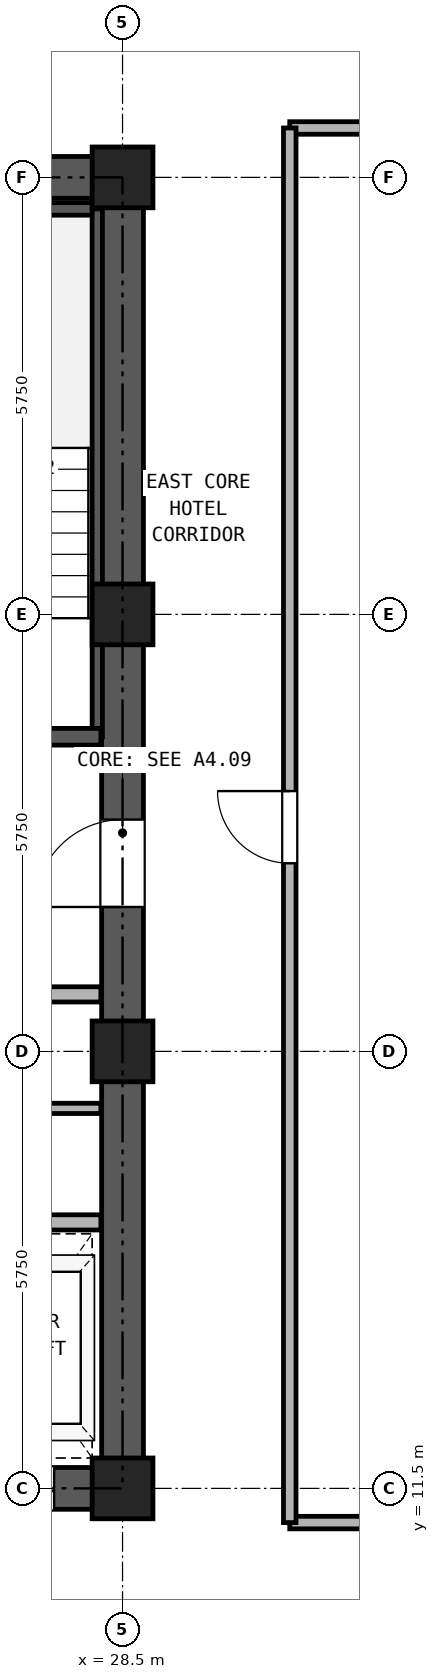
"""IFC4 building model, lengths in metres.
Left out: names, types, materials, properties, quantities, classifications, styles, units other than length and angle.
Written with IfcOpenShell. Run it as: python <this file> out.ifc"""

import sys

from ifc_helpers import new_model, si_unit, direction, frame, frame_2d, origin, origin_2d, place, context, subcontext, project, spatial, rectangle, hollow_rectangle, extrude, source, transform, mapped, element, fill, save


model = new_model("IFC4")
c1 = context("Model", 3, precision=1e-05, world=origin(), true_north=direction((0.0, 1.0)))
c2 = subcontext(c1, "Body", "Model", "MODEL_VIEW")
j1 = project(units=[si_unit("LENGTHUNIT", "METRE"), si_unit("PLANEANGLEUNIT", "RADIAN")], contexts=[c1])
p1 = place(None, origin())
s1 = spatial("IfcSite", under=j1, at=p1, CompositionType="ELEMENT")
p2 = place(p1, origin())
s2 = spatial("IfcBuilding", under=s1, at=p2, CompositionType="ELEMENT")
p3 = place(p2, frame((0.0, 0.0, 124.7)))
s3 = spatial("IfcBuildingStorey", under=s2, at=p3, CompositionType="ELEMENT", Elevation=124.7)
m1 = source(origin(), c2, "Body", "SweptSolid", [
    extrude(hollow_rectangle(XDim=0.8, YDim=0.8, WallThickness=0.045, at=origin_2d()), origin(), (0.0, 0.0, 1.0), 2.95),
])
for number, where, z_axis, x_axis in (
    (1, (28.5, 11.5, 0.0), (0.0, 0.0, 1.0), (1.0, 0.0, 0.0)),
    (2, (28.5, 17.25, 0.0), (0.0, 0.0, 1.0), (1.0, 0.0, 0.0)),
    (3, (28.5, 23.0, 0.0), (0.0, 0.0, 1.0), (1.0, 0.0, 0.0)),
    (4, (28.5, 28.75, 0.0), (0.0, 0.0, 1.0), (1.0, 0.0, 0.0)),
):
    element("IfcColumn", number, at=place(p3, frame(where, z_axis=z_axis, x_axis=x_axis)), inside=s3, PredefinedType="COLUMN", context=c2, shape_type="MappedRepresentation", body=[
        mapped(m1, transform((0.0, 0.0, 0.0), x_axis=(1.0, 0.0, 0.0), y_axis=(0.0, 1.0, 0.0), z_axis=(0.0, 0.0, 1.0), scale=1.0)),
    ])
p4 = place(p3, frame((18.225, 11.5, 0.0), z_axis=(0.0, 0.0, 1.0), x_axis=(1.0, 0.0, 0.0)))
e5 = element("IfcWall", 5, at=p4, inside=s3, PredefinedType="SHEAR", context=c2, shape_type="SweptSolid", body=[
    extrude(rectangle(XDim=10.55, YDim=0.55, at=frame_2d((5.275, 0.0))), origin(), (0.0, 0.0, 1.0), 2.95),
])
p5 = place(p4, frame((2.375, 0.0, 0.0)))
e6 = element("IfcOpeningElement", 6, at=p5, cuts=e5, PredefinedType="OPENING", context=c2, shape_type="SweptSolid", body=[
    extrude(rectangle(XDim=0.95, YDim=2.15, at=frame_2d((0.475, 1.075))), frame((0.0, 0.285, 0.0), z_axis=(0.0, -1.0, 0.0), x_axis=(1.0, 0.0, 0.0)), (0.0, 0.0, 1.0), 0.57),
])
p6 = place(p4, frame((5.875, 0.0, 0.0)))
e7 = element("IfcOpeningElement", 7, at=p6, cuts=e5, PredefinedType="OPENING", context=c2, shape_type="SweptSolid", body=[
    extrude(rectangle(XDim=1.1, YDim=2.25, at=frame_2d((0.55, 1.125))), frame((0.0, 0.285, 0.0), z_axis=(0.0, -1.0, 0.0), x_axis=(1.0, 0.0, 0.0)), (0.0, 0.0, 1.0), 0.57),
])
p7 = place(p4, frame((8.275, 0.0, 0.0)))
e8 = element("IfcOpeningElement", 8, at=p7, cuts=e5, PredefinedType="OPENING", context=c2, shape_type="SweptSolid", body=[
    extrude(rectangle(XDim=1.1, YDim=2.25, at=frame_2d((0.55, 1.125))), frame((0.0, 0.285, 0.0), z_axis=(0.0, -1.0, 0.0), x_axis=(1.0, 0.0, 0.0)), (0.0, 0.0, 1.0), 0.57),
])
p8 = place(p3, frame((18.225, 28.75, 0.0), z_axis=(0.0, 0.0, 1.0), x_axis=(1.0, 0.0, 0.0)))
e9 = element("IfcWall", 9, at=p8, inside=s3, PredefinedType="SHEAR", context=c2, shape_type="SweptSolid", body=[
    extrude(rectangle(XDim=10.55, YDim=0.55, at=frame_2d((5.275, 0.0))), origin(), (0.0, 0.0, 1.0), 2.95),
])
p9 = place(p8, frame((4.155, 0.0, 0.0)))
e10 = element("IfcOpeningElement", 10, at=p9, cuts=e9, PredefinedType="OPENING", context=c2, shape_type="SweptSolid", body=[
    extrude(rectangle(XDim=0.9, YDim=2.05, at=frame_2d((0.45, 1.025))), frame((0.0, 0.285, 0.0), z_axis=(0.0, -1.0, 0.0), x_axis=(1.0, 0.0, 0.0)), (0.0, 0.0, 1.0), 0.57),
])
p10 = place(p8, frame((5.695, 0.0, 0.0)))
e11 = element("IfcOpeningElement", 11, at=p10, cuts=e9, PredefinedType="OPENING", context=c2, shape_type="SweptSolid", body=[
    extrude(rectangle(XDim=0.9, YDim=2.05, at=frame_2d((0.45, 1.025))), frame((0.0, 0.285, 0.0), z_axis=(0.0, -1.0, 0.0), x_axis=(1.0, 0.0, 0.0)), (0.0, 0.0, 1.0), 0.57),
])
p11 = place(p3, frame((28.5, 11.775, 0.0), z_axis=(0.0, 0.0, 1.0), x_axis=(0.0, 1.0, 0.0)))
e12 = element("IfcWall", 12, at=p11, inside=s3, PredefinedType="SHEAR", context=c2, shape_type="SweptSolid", body=[
    extrude(rectangle(XDim=16.7, YDim=0.55, at=frame_2d((8.35, 0.0))), origin(), (0.0, 0.0, 1.0), 2.95),
])
p12 = place(p11, frame((7.375, 0.0, 0.0)))
e13 = element("IfcOpeningElement", 13, at=p12, cuts=e12, PredefinedType="OPENING", context=c2, shape_type="SweptSolid", body=[
    extrude(rectangle(XDim=1.15, YDim=2.2, at=frame_2d((0.575, 1.1))), frame((0.0, 0.285, 0.0), z_axis=(0.0, -1.0, 0.0), x_axis=(1.0, 0.0, 0.0)), (0.0, 0.0, 1.0), 0.57),
])
p13 = place(p3, frame((25.13, 28.335, 0.0), z_axis=(0.0, 0.0, 1.0), x_axis=(1.0, 0.0, 0.0)))
e14 = element("IfcWall", 14, at=p13, inside=s3, PredefinedType="PARTITIONING", context=c2, shape_type="SweptSolid", body=[
    extrude(rectangle(XDim=3.085, YDim=0.165, at=frame_2d((1.542, 0.0))), origin(), (0.0, 0.0, 1.0), 2.95),
])
p14 = place(p3, frame((28.167, 21.39, 0.0), z_axis=(0.0, 0.0, 1.0), x_axis=(0.0, 1.0, 0.0)))
e15 = element("IfcWall", 15, at=p14, inside=s3, PredefinedType="PARTITIONING", context=c2, shape_type="SweptSolid", body=[
    extrude(rectangle(XDim=6.945, YDim=0.135, at=frame_2d((3.473, 0.0))), origin(), (0.0, 0.0, 1.0), 2.95),
])
p15 = place(p3, frame((25.13, 21.39, 0.0), z_axis=(0.0, 0.0, 1.0), x_axis=(1.0, 0.0, 0.0)))
e16 = element("IfcWall", 16, at=p15, inside=s3, PredefinedType="SOLIDWALL", context=c2, shape_type="SweptSolid", body=[
    extrude(rectangle(XDim=3.085, YDim=0.22, at=frame_2d((1.542, 0.0))), origin(), (0.0, 0.0, 1.0), 2.95),
])
p16 = place(p15, frame((0.92, 0.0, 0.0)))
e17 = element("IfcOpeningElement", 17, at=p16, cuts=e16, PredefinedType="OPENING", context=c2, shape_type="SweptSolid", body=[
    extrude(rectangle(XDim=1.15, YDim=2.2, at=frame_2d((0.575, 1.1))), frame((0.0, 0.12, 0.0), z_axis=(0.0, -1.0, 0.0), x_axis=(1.0, 0.0, 0.0)), (0.0, 0.0, 1.0), 0.24),
])
p17 = place(p3, frame((18.785, 18.0, 0.0), z_axis=(0.0, 0.0, 1.0), x_axis=(1.0, 0.0, 0.0)))
e18 = element("IfcWall", 18, at=p17, inside=s3, PredefinedType="PARTITIONING", context=c2, shape_type="SweptSolid", body=[
    extrude(rectangle(XDim=9.43, YDim=0.2, at=frame_2d((4.715, 0.0))), origin(), (0.0, 0.0, 1.0), 2.95),
])
p18 = place(p17, frame((0.465, 0.0, 0.0)))
e19 = element("IfcOpeningElement", 19, at=p18, cuts=e18, PredefinedType="OPENING", context=c2, shape_type="SweptSolid", body=[
    extrude(rectangle(XDim=1.3, YDim=2.3, at=frame_2d((0.65, 1.15))), frame((0.0, 0.11, 0.0), z_axis=(0.0, -1.0, 0.0), x_axis=(1.0, 0.0, 0.0)), (0.0, 0.0, 1.0), 0.22),
])
p19 = place(p17, frame((2.565, 0.0, 0.0)))
e20 = element("IfcOpeningElement", 20, at=p19, cuts=e18, PredefinedType="OPENING", context=c2, shape_type="SweptSolid", body=[
    extrude(rectangle(XDim=1.3, YDim=2.3, at=frame_2d((0.65, 1.15))), frame((0.0, 0.11, 0.0), z_axis=(0.0, -1.0, 0.0), x_axis=(1.0, 0.0, 0.0)), (0.0, 0.0, 1.0), 0.22),
])
p20 = place(p17, frame((7.065, 0.0, 0.0)))
e21 = element("IfcOpeningElement", 21, at=p20, cuts=e18, PredefinedType="OPENING", context=c2, shape_type="SweptSolid", body=[
    extrude(rectangle(XDim=1.0, YDim=2.15, at=frame_2d((0.5, 1.075))), frame((0.0, 0.11, 0.0), z_axis=(0.0, -1.0, 0.0), x_axis=(1.0, 0.0, 0.0)), (0.0, 0.0, 1.0), 0.22),
])
p21 = place(p3, frame((18.785, 15.0, 0.0), z_axis=(0.0, 0.0, 1.0), x_axis=(1.0, 0.0, 0.0)))
e22 = element("IfcWall", 22, at=p21, inside=s3, PredefinedType="PARTITIONING", context=c2, shape_type="SweptSolid", body=[
    extrude(rectangle(XDim=9.43, YDim=0.2, at=frame_2d((4.715, 0.0))), origin(), (0.0, 0.0, 1.0), 2.95),
])
p22 = place(p3, frame((23.3, 16.5, 0.0), z_axis=(0.0, 0.0, 1.0), x_axis=(1.0, 0.0, 0.0)))
e23 = element("IfcWall", 23, at=p22, inside=s3, PredefinedType="PARTITIONING", context=c2, shape_type="SweptSolid", body=[
    extrude(rectangle(XDim=4.915, YDim=0.135, at=frame_2d((2.458, 0.0))), origin(), (0.0, 0.0, 1.0), 2.95),
])
p23 = place(p22, frame((2.55, 0.0, 0.0)))
e24 = element("IfcOpeningElement", 24, at=p23, cuts=e23, PredefinedType="OPENING", context=c2, shape_type="SweptSolid", body=[
    extrude(rectangle(XDim=0.9, YDim=2.05, at=frame_2d((0.45, 1.025))), frame((0.0, 0.077, 0.0), z_axis=(0.0, -1.0, 0.0), x_axis=(1.0, 0.0, 0.0)), (0.0, 0.0, 1.0), 0.155),
])
for number, where, z_axis, x_axis in (
    (25, (30.7, 11.05, 0.0), (0.0, 0.0, 1.0), (1.0, 0.0, 0.0)),
    (26, (30.7, 29.4, 0.0), (0.0, 0.0, 1.0), (1.0, 0.0, 0.0)),
):
    element("IfcWall", number, at=place(p3, frame(where, z_axis=z_axis, x_axis=x_axis)), inside=s3, PredefinedType="PARTITIONING", context=c2, shape_type="SweptSolid", body=[
        extrude(rectangle(XDim=6.7, YDim=0.165, at=frame_2d((3.35, 0.0))), origin(), (0.0, 0.0, 1.0), 2.95),
    ])
p24 = place(p3, frame((30.7, 11.05, 0.0), z_axis=(0.0, 0.0, 1.0), x_axis=(0.0, 1.0, 0.0)))
e27 = element("IfcWall", 27, at=p24, inside=s3, PredefinedType="PARTITIONING", context=c2, shape_type="SweptSolid", body=[
    extrude(rectangle(XDim=18.35, YDim=0.165, at=frame_2d((9.175, 0.0))), origin(), (0.0, 0.0, 1.0), 2.95),
])
p25 = place(p24, frame((8.675, 0.0, 0.0)))
e28 = element("IfcOpeningElement", 28, at=p25, cuts=e27, PredefinedType="OPENING", context=c2, shape_type="SweptSolid", body=[
    extrude(rectangle(XDim=0.95, YDim=2.15, at=frame_2d((0.475, 1.075))), frame((0.0, 0.093, 0.0), z_axis=(0.0, -1.0, 0.0), x_axis=(1.0, 0.0, 0.0)), (0.0, 0.0, 1.0), 0.185),
])
p26 = place(p12, origin())
e29 = element("IfcDoor", 29, at=p26, inside=s3, OperationType="SINGLE_SWING_LEFT", PredefinedType="DOOR", context=c2, shape_type="SweptSolid", body=[
    extrude(rectangle(XDim=1.15, YDim=2.2, at=frame_2d((0.575, 1.1))), frame((0.0, 0.025, 0.0), z_axis=(0.0, -1.0, 0.0), x_axis=(1.0, 0.0, 0.0)), (0.0, 0.0, 1.0), 0.05),
])
fill(e13, e29)
p27 = place(p7, frame((1.1, 0.0, 0.0), z_axis=(0.0, 0.0, 1.0), x_axis=(-1.0, 0.0, 0.0)))
e30 = element("IfcDoor", 30, at=p27, inside=s3, OperationType="DOUBLE_DOOR_SLIDING", PredefinedType="DOOR", context=c2, shape_type="SweptSolid", body=[
    extrude(rectangle(XDim=1.1, YDim=2.25, at=frame_2d((0.55, 1.125))), frame((0.0, 0.025, 0.0), z_axis=(0.0, -1.0, 0.0), x_axis=(1.0, 0.0, 0.0)), (0.0, 0.0, 1.0), 0.05),
])
fill(e8, e30)
p28 = place(p25, origin())
e31 = element("IfcDoor", 31, at=p28, inside=s3, OperationType="SINGLE_SWING_RIGHT", PredefinedType="DOOR", context=c2, shape_type="SweptSolid", body=[
    extrude(rectangle(XDim=0.95, YDim=2.15, at=frame_2d((0.475, 1.075))), frame((0.0, 0.025, 0.0), z_axis=(0.0, -1.0, 0.0), x_axis=(1.0, 0.0, 0.0)), (0.0, 0.0, 1.0), 0.05),
])
fill(e28, e31)
save(model, sys.argv[1])
